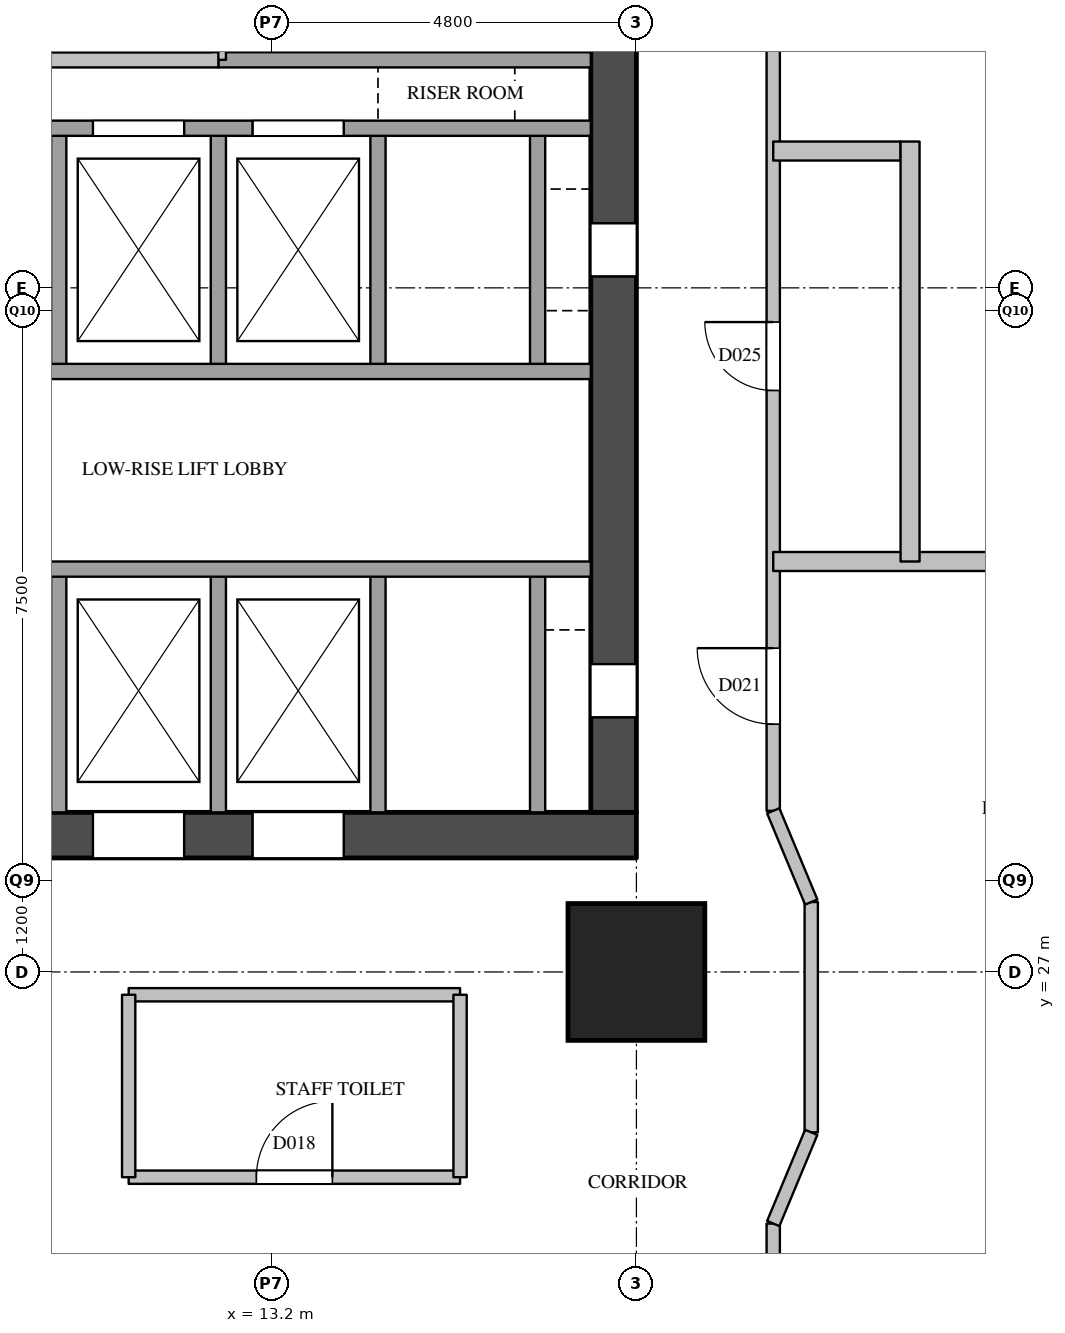
"""IFC4 building model, lengths in metres.
Left out: names, types, materials, properties, quantities, classifications, styles, units other than length and angle.
Written with IfcOpenShell. Run it as: python <this file> out.ifc"""

import sys

from ifc_helpers import new_model, si_unit, direction, frame, frame_2d, origin, origin_2d, place, context, subcontext, project, spatial, rectangle, extrude, element, fill, save


model = new_model("IFC4")
c1 = context("Model", 3, precision=1e-05, world=origin(), true_north=direction((0.0, 1.0)))
c2 = subcontext(c1, "Body", "Model", "MODEL_VIEW")
j1 = project(units=[si_unit("LENGTHUNIT", "METRE"), si_unit("PLANEANGLEUNIT", "RADIAN")], contexts=[c1])
p1 = place(None, origin())
s1 = spatial("IfcSite", under=j1, at=p1, CompositionType="ELEMENT")
p2 = place(p1, origin())
s2 = spatial("IfcBuilding", under=s1, at=p2, CompositionType="ELEMENT")
p3 = place(p2, frame((0.0, 0.0, 31.0)))
s3 = spatial("IfcBuildingStorey", under=s2, at=p3, CompositionType="ELEMENT", Elevation=31.0)
p4 = place(p3, frame((18.0, 27.0, 0.0), z_axis=(0.0, 0.0, 1.0), x_axis=(1.0, 0.0, 0.0)))
e1 = element("IfcColumn", 1, at=p4, inside=s3, PredefinedType="COLUMN", context=c2, shape_type="SweptSolid", body=[
    extrude(rectangle(XDim=1.8, YDim=1.8, at=origin_2d()), origin(), (0.0, 0.0, 1.0), 3.8),
])
p5 = place(p3, frame((5.6, 28.8, 0.0), z_axis=(0.0, 0.0, 1.0), x_axis=(1.0, 0.0, 0.0)))
e2 = element("IfcWall", 2, at=p5, inside=s3, PredefinedType="SHEAR", context=c2, shape_type="SweptSolid", body=[
    extrude(rectangle(XDim=12.4, YDim=0.6, at=frame_2d((6.2, 0.0))), origin(), (0.0, 0.0, 1.0), 3.5),
])
p6 = place(p5, frame((1.05, 0.0, 0.0)))
e3 = element("IfcOpeningElement", 3, at=p6, cuts=e2, PredefinedType="OPENING", context=c2, shape_type="SweptSolid", body=[
    extrude(rectangle(XDim=1.2, YDim=2.1, at=frame_2d((0.6, 1.05))), frame((0.0, 0.31, 0.0), z_axis=(0.0, -1.0, 0.0), x_axis=(1.0, 0.0, 0.0)), (0.0, 0.0, 1.0), 0.62),
])
p7 = place(p5, frame((5.25, 0.0, 0.0)))
e4 = element("IfcOpeningElement", 4, at=p7, cuts=e2, PredefinedType="OPENING", context=c2, shape_type="SweptSolid", body=[
    extrude(rectangle(XDim=1.2, YDim=2.1, at=frame_2d((0.6, 1.05))), frame((0.0, 0.31, 0.0), z_axis=(0.0, -1.0, 0.0), x_axis=(1.0, 0.0, 0.0)), (0.0, 0.0, 1.0), 0.62),
])
p8 = place(p5, frame((7.35, 0.0, 0.0)))
e5 = element("IfcOpeningElement", 5, at=p8, cuts=e2, PredefinedType="OPENING", context=c2, shape_type="SweptSolid", body=[
    extrude(rectangle(XDim=1.2, YDim=2.1, at=frame_2d((0.6, 1.05))), frame((0.0, 0.31, 0.0), z_axis=(0.0, -1.0, 0.0), x_axis=(1.0, 0.0, 0.0)), (0.0, 0.0, 1.0), 0.62),
])
p9 = place(p3, frame((17.7, 29.1, 0.0), z_axis=(0.0, 0.0, 1.0), x_axis=(0.0, 1.0, 0.0)))
e6 = element("IfcWall", 6, at=p9, inside=s3, PredefinedType="SHEAR", context=c2, shape_type="SweptSolid", body=[
    extrude(rectangle(XDim=20.3, YDim=0.6, at=frame_2d((10.15, 0.0))), origin(), (0.0, 0.0, 1.0), 3.5),
])
p10 = place(p9, frame((1.25, 0.0, 0.0)))
e7 = element("IfcOpeningElement", 7, at=p10, cuts=e6, PredefinedType="OPENING", context=c2, shape_type="SweptSolid", body=[
    extrude(rectangle(XDim=0.7, YDim=2.1, at=frame_2d((0.35, 1.05))), frame((0.0, 0.31, 0.0), z_axis=(0.0, -1.0, 0.0), x_axis=(1.0, 0.0, 0.0)), (0.0, 0.0, 1.0), 0.62),
])
p11 = place(p9, frame((7.05, 0.0, 0.0)))
e8 = element("IfcOpeningElement", 8, at=p11, cuts=e6, PredefinedType="OPENING", context=c2, shape_type="SweptSolid", body=[
    extrude(rectangle(XDim=0.7, YDim=2.1, at=frame_2d((0.35, 1.05))), frame((0.0, 0.31, 0.0), z_axis=(0.0, -1.0, 0.0), x_axis=(1.0, 0.0, 0.0)), (0.0, 0.0, 1.0), 0.62),
])
p12 = place(p3, frame((10.4, 29.1, 0.0), z_axis=(0.0, 0.0, 1.0), x_axis=(0.0, 1.0, 0.0)))
e9 = element("IfcWall", 9, at=p12, inside=s3, PredefinedType="SOLIDWALL", context=c2, shape_type="SweptSolid", body=[
    extrude(rectangle(XDim=3.2, YDim=0.2, at=frame_2d((1.6, 0.0))), origin(), (0.0, 0.0, 1.0), 3.5),
])
p13 = place(p3, frame((10.4, 34.9, 0.0), z_axis=(0.0, 0.0, 1.0), x_axis=(0.0, 1.0, 0.0)))
e10 = element("IfcWall", 10, at=p13, inside=s3, PredefinedType="SOLIDWALL", context=c2, shape_type="SweptSolid", body=[
    extrude(rectangle(XDim=3.2, YDim=0.2, at=frame_2d((1.6, 0.0))), origin(), (0.0, 0.0, 1.0), 3.5),
])
p14 = place(p3, frame((12.5, 29.1, 0.0), z_axis=(0.0, 0.0, 1.0), x_axis=(0.0, 1.0, 0.0)))
e11 = element("IfcWall", 11, at=p14, inside=s3, PredefinedType="SOLIDWALL", context=c2, shape_type="SweptSolid", body=[
    extrude(rectangle(XDim=3.2, YDim=0.2, at=frame_2d((1.6, 0.0))), origin(), (0.0, 0.0, 1.0), 3.5),
])
p15 = place(p3, frame((12.5, 34.9, 0.0), z_axis=(0.0, 0.0, 1.0), x_axis=(0.0, 1.0, 0.0)))
e12 = element("IfcWall", 12, at=p15, inside=s3, PredefinedType="SOLIDWALL", context=c2, shape_type="SweptSolid", body=[
    extrude(rectangle(XDim=3.2, YDim=0.2, at=frame_2d((1.6, 0.0))), origin(), (0.0, 0.0, 1.0), 3.5),
])
p16 = place(p3, frame((12.5, 39.0, 0.0), z_axis=(0.0, 0.0, 1.0), x_axis=(0.0, 1.0, 0.0)))
e13 = element("IfcWall", 13, at=p16, inside=s3, PredefinedType="SOLIDWALL", context=c2, shape_type="SweptSolid", body=[
    extrude(rectangle(XDim=1.9, YDim=0.2, at=frame_2d((0.95, 0.0))), origin(), (0.0, 0.0, 1.0), 3.5),
])
p17 = place(p3, frame((14.6, 29.1, 0.0), z_axis=(0.0, 0.0, 1.0), x_axis=(0.0, 1.0, 0.0)))
e14 = element("IfcWall", 14, at=p17, inside=s3, PredefinedType="SOLIDWALL", context=c2, shape_type="SweptSolid", body=[
    extrude(rectangle(XDim=3.2, YDim=0.2, at=frame_2d((1.6, 0.0))), origin(), (0.0, 0.0, 1.0), 3.5),
])
p18 = place(p3, frame((14.6, 34.9, 0.0), z_axis=(0.0, 0.0, 1.0), x_axis=(0.0, 1.0, 0.0)))
e15 = element("IfcWall", 15, at=p18, inside=s3, PredefinedType="SOLIDWALL", context=c2, shape_type="SweptSolid", body=[
    extrude(rectangle(XDim=3.2, YDim=0.2, at=frame_2d((1.6, 0.0))), origin(), (0.0, 0.0, 1.0), 3.5),
])
p19 = place(p3, frame((16.7, 29.1, 0.0), z_axis=(0.0, 0.0, 1.0), x_axis=(0.0, 1.0, 0.0)))
e16 = element("IfcWall", 16, at=p19, inside=s3, PredefinedType="SOLIDWALL", context=c2, shape_type="SweptSolid", body=[
    extrude(rectangle(XDim=3.2, YDim=0.2, at=frame_2d((1.6, 0.0))), origin(), (0.0, 0.0, 1.0), 3.5),
])
p20 = place(p3, frame((16.7, 34.9, 0.0), z_axis=(0.0, 0.0, 1.0), x_axis=(0.0, 1.0, 0.0)))
e17 = element("IfcWall", 17, at=p20, inside=s3, PredefinedType="SOLIDWALL", context=c2, shape_type="SweptSolid", body=[
    extrude(rectangle(XDim=3.2, YDim=0.2, at=frame_2d((1.6, 0.0))), origin(), (0.0, 0.0, 1.0), 3.5),
])
p21 = place(p3, frame((6.2, 32.3, 0.0), z_axis=(0.0, 0.0, 1.0), x_axis=(1.0, 0.0, 0.0)))
e18 = element("IfcWall", 18, at=p21, inside=s3, PredefinedType="SOLIDWALL", context=c2, shape_type="SweptSolid", body=[
    extrude(rectangle(XDim=11.2, YDim=0.2, at=frame_2d((5.6, 0.0))), origin(), (0.0, 0.0, 1.0), 3.5),
])
p22 = place(p21, frame((2.55, 0.0, 0.0)))
e19 = element("IfcOpeningElement", 19, at=p22, cuts=e18, PredefinedType="OPENING", context=c2, shape_type="SweptSolid", body=[
    extrude(rectangle(XDim=1.2, YDim=2.1, at=frame_2d((0.6, 1.05))), frame((0.0, 0.11, 0.0), z_axis=(0.0, -1.0, 0.0), x_axis=(1.0, 0.0, 0.0)), (0.0, 0.0, 1.0), 0.22),
])
p23 = place(p3, frame((6.2, 34.9, 0.0), z_axis=(0.0, 0.0, 1.0), x_axis=(1.0, 0.0, 0.0)))
e20 = element("IfcWall", 20, at=p23, inside=s3, PredefinedType="SOLIDWALL", context=c2, shape_type="SweptSolid", body=[
    extrude(rectangle(XDim=11.2, YDim=0.2, at=frame_2d((5.6, 0.0))), origin(), (0.0, 0.0, 1.0), 3.5),
])
p24 = place(p3, frame((6.2, 38.1, 0.0), z_axis=(0.0, 0.0, 1.0), x_axis=(1.0, 0.0, 0.0)))
e21 = element("IfcWall", 21, at=p24, inside=s3, PredefinedType="SOLIDWALL", context=c2, shape_type="SweptSolid", body=[
    extrude(rectangle(XDim=11.2, YDim=0.2, at=frame_2d((5.6, 0.0))), origin(), (0.0, 0.0, 1.0), 3.5),
])
p25 = place(p24, frame((0.45, 0.0, 0.0)))
e22 = element("IfcOpeningElement", 22, at=p25, cuts=e21, PredefinedType="OPENING", context=c2, shape_type="SweptSolid", body=[
    extrude(rectangle(XDim=1.2, YDim=2.1, at=frame_2d((0.6, 1.05))), frame((0.0, 0.11, 0.0), z_axis=(0.0, -1.0, 0.0), x_axis=(1.0, 0.0, 0.0)), (0.0, 0.0, 1.0), 0.22),
])
p26 = place(p24, frame((2.55, 0.0, 0.0)))
e23 = element("IfcOpeningElement", 23, at=p26, cuts=e21, PredefinedType="OPENING", context=c2, shape_type="SweptSolid", body=[
    extrude(rectangle(XDim=1.2, YDim=2.1, at=frame_2d((0.6, 1.05))), frame((0.0, 0.11, 0.0), z_axis=(0.0, -1.0, 0.0), x_axis=(1.0, 0.0, 0.0)), (0.0, 0.0, 1.0), 0.22),
])
p27 = place(p24, frame((4.65, 0.0, 0.0)))
e24 = element("IfcOpeningElement", 24, at=p27, cuts=e21, PredefinedType="OPENING", context=c2, shape_type="SweptSolid", body=[
    extrude(rectangle(XDim=1.2, YDim=2.1, at=frame_2d((0.6, 1.05))), frame((0.0, 0.11, 0.0), z_axis=(0.0, -1.0, 0.0), x_axis=(1.0, 0.0, 0.0)), (0.0, 0.0, 1.0), 0.22),
])
p28 = place(p24, frame((6.75, 0.0, 0.0)))
e25 = element("IfcOpeningElement", 25, at=p28, cuts=e21, PredefinedType="OPENING", context=c2, shape_type="SweptSolid", body=[
    extrude(rectangle(XDim=1.2, YDim=2.1, at=frame_2d((0.6, 1.05))), frame((0.0, 0.11, 0.0), z_axis=(0.0, -1.0, 0.0), x_axis=(1.0, 0.0, 0.0)), (0.0, 0.0, 1.0), 0.22),
])
p29 = place(p3, frame((12.5, 39.0, 0.0), z_axis=(0.0, 0.0, 1.0), x_axis=(1.0, 0.0, 0.0)))
e26 = element("IfcWall", 26, at=p29, inside=s3, PredefinedType="SOLIDWALL", context=c2, shape_type="SweptSolid", body=[
    extrude(rectangle(XDim=4.9, YDim=0.2, at=frame_2d((2.45, 0.0))), origin(), (0.0, 0.0, 1.0), 3.5),
])
p30 = place(p3, frame((9.45, 39.0, 0.0), z_axis=(0.0, 0.0, 1.0), x_axis=(1.0, 0.0, 0.0)))
e27 = element("IfcWall", 27, at=p30, inside=s3, PredefinedType="SOLIDWALL", context=c2, shape_type="SweptSolid", body=[
    extrude(rectangle(XDim=3.05, YDim=0.2, at=frame_2d((1.525, 0.0))), origin(), (0.0, 0.0, 1.0), 3.5),
])
p31 = place(p3, frame((11.32, 24.3, 0.0), z_axis=(0.0, 0.0, 1.0), x_axis=(1.0, 0.0, 0.0)))
e28 = element("IfcWall", 28, at=p31, inside=s3, PredefinedType="PARTITIONING", context=c2, shape_type="SweptSolid", body=[
    extrude(rectangle(XDim=4.36, YDim=0.175, at=frame_2d((2.18, 0.0))), origin(), (0.0, 0.0, 1.0), 3.5),
])
p32 = place(p31, frame((1.68, 0.0, 0.0)))
e29 = element("IfcOpeningElement", 29, at=p32, cuts=e28, PredefinedType="OPENING", context=c2, shape_type="SweptSolid", body=[
    extrude(rectangle(XDim=1.0, YDim=2.1, at=frame_2d((0.5, 1.05))), frame((0.0, 0.097, 0.0), z_axis=(0.0, -1.0, 0.0), x_axis=(1.0, 0.0, 0.0)), (0.0, 0.0, 1.0), 0.195),
])
p33 = place(p3, frame((11.32, 26.7, 0.0), z_axis=(0.0, 0.0, 1.0), x_axis=(1.0, 0.0, 0.0)))
e30 = element("IfcWall", 30, at=p33, inside=s3, PredefinedType="PARTITIONING", context=c2, shape_type="SweptSolid", body=[
    extrude(rectangle(XDim=4.36, YDim=0.175, at=frame_2d((2.18, 0.0))), origin(), (0.0, 0.0, 1.0), 2.5),
])
for number, where, z_axis, x_axis in (
    (31, (11.32, 24.3, 0.0), (0.0, 0.0, 1.0), (0.0, 1.0, 0.0)),
    (32, (15.68, 24.3, 0.0), (0.0, 0.0, 1.0), (0.0, 1.0, 0.0)),
):
    element("IfcWall", number, at=place(p3, frame(where, z_axis=z_axis, x_axis=x_axis)), inside=s3, PredefinedType="PARTITIONING", context=c2, shape_type="SweptSolid", body=[
        extrude(rectangle(XDim=2.4, YDim=0.175, at=frame_2d((1.2, 0.0))), origin(), (0.0, 0.0, 1.0), 2.5),
    ])
p34 = place(p3, frame((19.8, 7.2, 0.0), z_axis=(0.0, 0.0, 1.0), x_axis=(0.0, 1.0, 0.0)))
e33 = element("IfcWall", 33, at=p34, inside=s3, PredefinedType="PARTITIONING", context=c2, shape_type="SweptSolid", body=[
    extrude(rectangle(XDim=16.49, YDim=0.175, at=frame_2d((8.245, 0.0))), origin(), (0.0, 0.0, 1.0), 3.5),
])
p35 = place(p34, frame((1.35, 0.0, 0.0)))
e34 = element("IfcOpeningElement", 34, at=p35, cuts=e33, PredefinedType="OPENING", context=c2, shape_type="SweptSolid", body=[
    extrude(rectangle(XDim=0.9, YDim=2.1, at=frame_2d((0.45, 1.05))), frame((0.0, 0.097, 0.0), z_axis=(0.0, -1.0, 0.0), x_axis=(1.0, 0.0, 0.0)), (0.0, 0.0, 1.0), 0.195),
])
p36 = place(p34, frame((8.5, 0.0, 0.0)))
e35 = element("IfcOpeningElement", 35, at=p36, cuts=e33, PredefinedType="OPENING", context=c2, shape_type="SweptSolid", body=[
    extrude(rectangle(XDim=1.0, YDim=2.1, at=frame_2d((0.5, 1.05))), frame((0.0, 0.097, 0.0), z_axis=(0.0, -1.0, 0.0), x_axis=(1.0, 0.0, 0.0)), (0.0, 0.0, 1.0), 0.195),
])
p37 = place(p3, frame((19.8, 29.12, 0.0), z_axis=(0.0, 0.0, 1.0), x_axis=(0.0, 1.0, 0.0)))
e36 = element("IfcWall", 36, at=p37, inside=s3, PredefinedType="PARTITIONING", context=c2, shape_type="SweptSolid", body=[
    extrude(rectangle(XDim=22.68, YDim=0.175, at=frame_2d((11.34, 0.0))), origin(), (0.0, 0.0, 1.0), 3.5),
])
p38 = place(p37, frame((1.14, 0.0, 0.0)))
e37 = element("IfcOpeningElement", 37, at=p38, cuts=e36, PredefinedType="OPENING", context=c2, shape_type="SweptSolid", body=[
    extrude(rectangle(XDim=1.0, YDim=2.1, at=frame_2d((0.5, 1.05))), frame((0.0, 0.097, 0.0), z_axis=(0.0, -1.0, 0.0), x_axis=(1.0, 0.0, 0.0)), (0.0, 0.0, 1.0), 0.195),
])
p39 = place(p37, frame((5.53, 0.0, 0.0)))
e38 = element("IfcOpeningElement", 38, at=p39, cuts=e36, PredefinedType="OPENING", context=c2, shape_type="SweptSolid", body=[
    extrude(rectangle(XDim=0.9, YDim=2.1, at=frame_2d((0.45, 1.05))), frame((0.0, 0.097, 0.0), z_axis=(0.0, -1.0, 0.0), x_axis=(1.0, 0.0, 0.0)), (0.0, 0.0, 1.0), 0.195),
])
p40 = place(p37, frame((15.23, 0.0, 0.0)))
e39 = element("IfcOpeningElement", 39, at=p40, cuts=e36, PredefinedType="OPENING", context=c2, shape_type="SweptSolid", body=[
    extrude(rectangle(XDim=0.9, YDim=2.1, at=frame_2d((0.45, 1.05))), frame((0.0, 0.097, 0.0), z_axis=(0.0, -1.0, 0.0), x_axis=(1.0, 0.0, 0.0)), (0.0, 0.0, 1.0), 0.195),
])
p41 = place(p3, frame((20.3, 24.89, 0.0), z_axis=(0.0, 0.0, 1.0), x_axis=(0.0, 1.0, 0.0)))
e40 = element("IfcWall", 40, at=p41, inside=s3, PredefinedType="PARTITIONING", context=c2, shape_type="SweptSolid", body=[
    extrude(rectangle(XDim=3.03, YDim=0.175, at=frame_2d((1.515, 0.0))), origin(), (0.0, 0.0, 1.0), 2.5),
])
p42 = place(p3, frame((19.8, 32.4, 0.0), z_axis=(0.0, 0.0, 1.0), x_axis=(1.0, 0.0, 0.0)))
e41 = element("IfcWall", 41, at=p42, inside=s3, PredefinedType="PARTITIONING", context=c2, shape_type="SweptSolid", body=[
    extrude(rectangle(XDim=7.2, YDim=0.25, at=frame_2d((3.6, 0.0))), origin(), (0.0, 0.0, 1.0), 2.5),
])
p43 = place(p3, frame((19.8, 37.8, 0.0), z_axis=(0.0, 0.0, 1.0), x_axis=(1.0, 0.0, 0.0)))
e42 = element("IfcWall", 42, at=p43, inside=s3, PredefinedType="PARTITIONING", context=c2, shape_type="SweptSolid", body=[
    extrude(rectangle(XDim=1.675, YDim=0.25, at=frame_2d((0.837, 0.0))), origin(), (0.0, 0.0, 1.0), 3.5),
])
p44 = place(p3, frame((21.6, 32.4, 0.0), z_axis=(0.0, 0.0, 1.0), x_axis=(0.0, 1.0, 0.0)))
e43 = element("IfcWall", 43, at=p44, inside=s3, PredefinedType="PARTITIONING", context=c2, shape_type="SweptSolid", body=[
    extrude(rectangle(XDim=5.525, YDim=0.25, at=frame_2d((2.763, 0.0))), origin(), (0.0, 0.0, 1.0), 3.5),
])
p45 = place(p3, frame((19.8, 29.12, 0.0), z_axis=(0.0, 0.0, 1.0), x_axis=(0.384562051588, -0.923099143363, 0.0)))
e44 = element("IfcWall", 44, at=p45, inside=s3, PredefinedType="PARTITIONING", context=c2, shape_type="SweptSolid", body=[
    extrude(rectangle(XDim=1.3, YDim=0.175, at=frame_2d((0.65, 0.0))), origin(), (0.0, 0.0, 1.0), 3.5),
])
p46 = place(p3, frame((20.3, 24.89, 0.0), z_axis=(0.0, 0.0, 1.0), x_axis=(-0.384628719983, -0.923071366561, 0.0)))
e45 = element("IfcWall", 45, at=p46, inside=s3, PredefinedType="PARTITIONING", context=c2, shape_type="SweptSolid", body=[
    extrude(rectangle(XDim=1.3, YDim=0.175, at=frame_2d((0.65, 0.0))), origin(), (0.0, 0.0, 1.0), 3.5),
])
p47 = place(p7, origin())
e46 = element("IfcDoor", 46, at=p47, inside=s3, OperationType="SLIDING_TO_LEFT", PredefinedType="DOOR", context=c2, shape_type="SweptSolid", body=[
    extrude(rectangle(XDim=1.2, YDim=2.1, at=frame_2d((0.6, 1.05))), frame((0.0, 0.025, 0.0), z_axis=(0.0, -1.0, 0.0), x_axis=(1.0, 0.0, 0.0)), (0.0, 0.0, 1.0), 0.05),
])
fill(e4, e46)
p48 = place(p8, origin())
e47 = element("IfcDoor", 47, at=p48, inside=s3, OperationType="SLIDING_TO_LEFT", PredefinedType="DOOR", context=c2, shape_type="SweptSolid", body=[
    extrude(rectangle(XDim=1.2, YDim=2.1, at=frame_2d((0.6, 1.05))), frame((0.0, 0.025, 0.0), z_axis=(0.0, -1.0, 0.0), x_axis=(1.0, 0.0, 0.0)), (0.0, 0.0, 1.0), 0.05),
])
fill(e5, e47)
p49 = place(p27, origin())
e48 = element("IfcDoor", 48, at=p49, inside=s3, OperationType="SLIDING_TO_LEFT", PredefinedType="DOOR", context=c2, shape_type="SweptSolid", body=[
    extrude(rectangle(XDim=1.2, YDim=2.1, at=frame_2d((0.6, 1.05))), frame((0.0, 0.025, 0.0), z_axis=(0.0, -1.0, 0.0), x_axis=(1.0, 0.0, 0.0)), (0.0, 0.0, 1.0), 0.05),
])
fill(e24, e48)
p50 = place(p28, origin())
e49 = element("IfcDoor", 49, at=p50, inside=s3, OperationType="SLIDING_TO_LEFT", PredefinedType="DOOR", context=c2, shape_type="SweptSolid", body=[
    extrude(rectangle(XDim=1.2, YDim=2.1, at=frame_2d((0.6, 1.05))), frame((0.0, 0.025, 0.0), z_axis=(0.0, -1.0, 0.0), x_axis=(1.0, 0.0, 0.0)), (0.0, 0.0, 1.0), 0.05),
])
fill(e25, e49)
p51 = place(p10, origin())
e50 = element("IfcDoor", 50, at=p51, inside=s3, OperationType="SINGLE_SWING_LEFT", PredefinedType="DOOR", context=c2, shape_type="SweptSolid", body=[
    extrude(rectangle(XDim=0.7, YDim=2.1, at=frame_2d((0.35, 1.05))), frame((0.0, 0.025, 0.0), z_axis=(0.0, -1.0, 0.0), x_axis=(1.0, 0.0, 0.0)), (0.0, 0.0, 1.0), 0.05),
])
fill(e7, e50)
p52 = place(p11, origin())
e51 = element("IfcDoor", 51, at=p52, inside=s3, OperationType="SINGLE_SWING_LEFT", PredefinedType="DOOR", context=c2, shape_type="SweptSolid", body=[
    extrude(rectangle(XDim=0.7, YDim=2.1, at=frame_2d((0.35, 1.05))), frame((0.0, 0.025, 0.0), z_axis=(0.0, -1.0, 0.0), x_axis=(1.0, 0.0, 0.0)), (0.0, 0.0, 1.0), 0.05),
])
fill(e8, e51)
p53 = place(p32, origin())
e52 = element("IfcDoor", 52, at=p53, inside=s3, OperationType="SINGLE_SWING_RIGHT", PredefinedType="DOOR", context=c2, shape_type="SweptSolid", body=[
    extrude(rectangle(XDim=1.0, YDim=2.1, at=frame_2d((0.5, 1.05))), frame((0.0, 0.025, 0.0), z_axis=(0.0, -1.0, 0.0), x_axis=(1.0, 0.0, 0.0)), (0.0, 0.0, 1.0), 0.05),
])
fill(e29, e52)
p54 = place(p38, origin())
e53 = element("IfcDoor", 53, at=p54, inside=s3, OperationType="SINGLE_SWING_RIGHT", PredefinedType="DOOR", context=c2, shape_type="SweptSolid", body=[
    extrude(rectangle(XDim=1.0, YDim=2.1, at=frame_2d((0.5, 1.05))), frame((0.0, 0.025, 0.0), z_axis=(0.0, -1.0, 0.0), x_axis=(1.0, 0.0, 0.0)), (0.0, 0.0, 1.0), 0.05),
])
fill(e37, e53)
p55 = place(p39, origin())
e54 = element("IfcDoor", 54, at=p55, inside=s3, OperationType="SINGLE_SWING_RIGHT", PredefinedType="DOOR", context=c2, shape_type="SweptSolid", body=[
    extrude(rectangle(XDim=0.9, YDim=2.1, at=frame_2d((0.45, 1.05))), frame((0.0, 0.025, 0.0), z_axis=(0.0, -1.0, 0.0), x_axis=(1.0, 0.0, 0.0)), (0.0, 0.0, 1.0), 0.05),
])
fill(e38, e54)
save(model, sys.argv[1])
